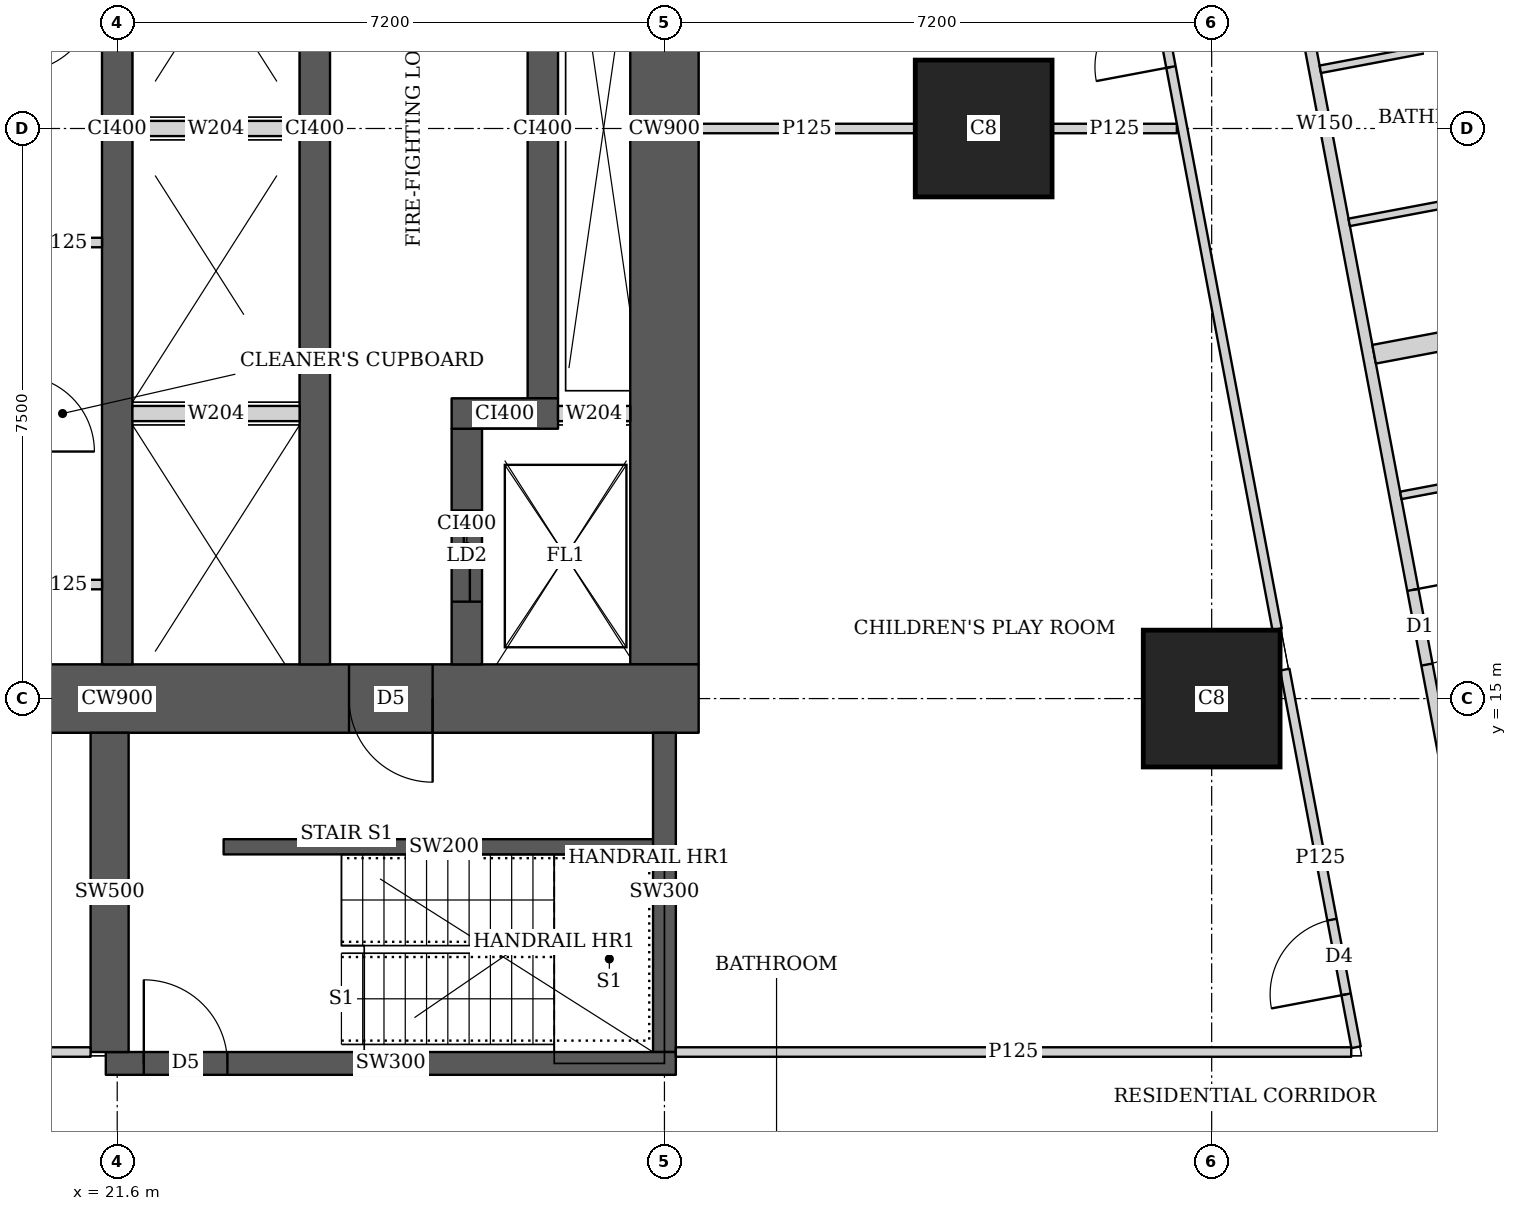
"""IFC4 building model, lengths in metres.
Left out: names, types, materials, properties, quantities, classifications, styles, units other than length and angle.
Written with IfcOpenShell. Run it as: python <this file> out.ifc"""

import sys

from ifc_helpers import new_model, si_unit, direction, frame, frame_2d, origin, origin_2d, place, context, subcontext, project, spatial, rectangle, extrude, element, fill, save


model = new_model("IFC4")
c1 = context("Model", 3, precision=1e-05, world=origin(), true_north=direction((0.0, 1.0)))
c2 = subcontext(c1, "Body", "Model", "MODEL_VIEW")
j1 = project(units=[si_unit("LENGTHUNIT", "METRE"), si_unit("PLANEANGLEUNIT", "RADIAN")], contexts=[c1])
p1 = place(None, origin())
s1 = spatial("IfcSite", under=j1, at=p1, CompositionType="ELEMENT")
p2 = place(p1, origin())
s2 = spatial("IfcBuilding", under=s1, at=p2, CompositionType="ELEMENT")
p3 = place(p2, frame((0.0, 0.0, 65.0)))
s3 = spatial("IfcBuildingStorey", under=s2, at=p3, CompositionType="ELEMENT", Elevation=65.0)
for number, where, z_axis, x_axis in (
    (1, (36.0, 15.0, 0.0), (0.0, 0.0, 1.0), (1.0, 0.0, 0.0)),
    (2, (33.0, 22.5, 0.0), (0.0, 0.0, 1.0), (1.0, 0.0, 0.0)),
):
    element("IfcColumn", number, at=place(p3, frame(where, z_axis=z_axis, x_axis=x_axis)), inside=s3, PredefinedType="COLUMN", context=c2, shape_type="SweptSolid", body=[
        extrude(rectangle(XDim=1.8, YDim=1.8, at=origin_2d()), origin(), (0.0, 0.0, 1.0), 3.75),
    ])
p4 = place(p3, frame((13.95, 15.0, 0.0), z_axis=(0.0, 0.0, 1.0), x_axis=(1.0, 0.0, 0.0)))
e3 = element("IfcWall", 3, at=p4, inside=s3, PredefinedType="SHEAR", context=c2, shape_type="SweptSolid", body=[
    extrude(rectangle(XDim=15.3, YDim=0.9, at=frame_2d((7.65, 0.0))), origin(), (0.0, 0.0, 1.0), 3.75),
])
p5 = place(p4, frame((4.45, 0.0, 0.0)))
e4 = element("IfcOpeningElement", 4, at=p5, cuts=e3, PredefinedType="OPENING", context=c2, shape_type="SweptSolid", body=[
    extrude(rectangle(XDim=1.8, YDim=2.1, at=frame_2d((0.9, 1.05))), frame((0.0, 0.46, 0.0), z_axis=(0.0, -1.0, 0.0), x_axis=(1.0, 0.0, 0.0)), (0.0, 0.0, 1.0), 0.92),
])
p6 = place(p4, frame((10.7, 0.0, 0.0)))
e5 = element("IfcOpeningElement", 5, at=p6, cuts=e3, PredefinedType="OPENING", context=c2, shape_type="SweptSolid", body=[
    extrude(rectangle(XDim=1.1, YDim=2.1, at=frame_2d((0.55, 1.05))), frame((0.0, 0.46, 0.0), z_axis=(0.0, -1.0, 0.0), x_axis=(1.0, 0.0, 0.0)), (0.0, 0.0, 1.0), 0.92),
])
p7 = place(p3, frame((28.8, 15.45, 0.0), z_axis=(0.0, 0.0, 1.0), x_axis=(0.0, 1.0, 0.0)))
e6 = element("IfcWall", 6, at=p7, inside=s3, PredefinedType="SHEAR", context=c2, shape_type="SweptSolid", body=[
    extrude(rectangle(XDim=14.1, YDim=0.9, at=frame_2d((7.05, 0.0))), origin(), (0.0, 0.0, 1.0), 3.75),
])
for number, where, z_axis, x_axis in (
    (7, (21.6, 15.45, 0.0), (0.0, 0.0, 1.0), (0.0, 1.0, 0.0)),
    (8, (24.2, 15.45, 0.0), (0.0, 0.0, 1.0), (0.0, 1.0, 0.0)),
):
    element("IfcWall", number, at=place(p3, frame(where, z_axis=z_axis, x_axis=x_axis)), inside=s3, PredefinedType="SHEAR", context=c2, shape_type="SweptSolid", body=[
        extrude(rectangle(XDim=14.1, YDim=0.4, at=frame_2d((7.05, 0.0))), origin(), (0.0, 0.0, 1.0), 3.75),
    ])
p8 = place(p3, frame((26.2, 15.45, 0.0), z_axis=(0.0, 0.0, 1.0), x_axis=(0.0, 1.0, 0.0)))
e9 = element("IfcWall", 9, at=p8, inside=s3, PredefinedType="SHEAR", context=c2, shape_type="SweptSolid", body=[
    extrude(rectangle(XDim=3.1, YDim=0.4, at=frame_2d((1.55, 0.0))), origin(), (0.0, 0.0, 1.0), 3.75),
])
p9 = place(p8, frame((0.825, 0.0, 0.0)))
e10 = element("IfcOpeningElement", 10, at=p9, cuts=e9, PredefinedType="OPENING", context=c2, shape_type="SweptSolid", body=[
    extrude(rectangle(XDim=1.2, YDim=2.1, at=frame_2d((0.6, 1.05))), frame((0.0, 0.21, 0.0), z_axis=(0.0, -1.0, 0.0), x_axis=(1.0, 0.0, 0.0)), (0.0, 0.0, 1.0), 0.42),
])
p10 = place(p3, frame((26.0, 18.75, 0.0), z_axis=(0.0, 0.0, 1.0), x_axis=(1.0, 0.0, 0.0)))
e11 = element("IfcWall", 11, at=p10, inside=s3, PredefinedType="SHEAR", context=c2, shape_type="SweptSolid", body=[
    extrude(rectangle(XDim=1.4, YDim=0.4, at=frame_2d((0.7, 0.0))), origin(), (0.0, 0.0, 1.0), 3.75),
])
p11 = place(p3, frame((27.2, 18.95, 0.0), z_axis=(0.0, 0.0, 1.0), x_axis=(0.0, 1.0, 0.0)))
e12 = element("IfcWall", 12, at=p11, inside=s3, PredefinedType="SHEAR", context=c2, shape_type="SweptSolid", body=[
    extrude(rectangle(XDim=7.1, YDim=0.4, at=frame_2d((3.55, 0.0))), origin(), (0.0, 0.0, 1.0), 3.75),
])
p12 = place(p3, frame((21.45, 10.2, 0.0), z_axis=(0.0, 0.0, 1.0), x_axis=(1.0, 0.0, 0.0)))
e13 = element("IfcWall", 13, at=p12, inside=s3, PredefinedType="SHEAR", context=c2, shape_type="SweptSolid", body=[
    extrude(rectangle(XDim=7.5, YDim=0.3, at=frame_2d((3.75, 0.0))), origin(), (0.0, 0.0, 1.0), 3.75),
])
p13 = place(p12, frame((0.5, 0.0, 0.0)))
e14 = element("IfcOpeningElement", 14, at=p13, cuts=e13, PredefinedType="OPENING", context=c2, shape_type="SweptSolid", body=[
    extrude(rectangle(XDim=1.1, YDim=2.1, at=frame_2d((0.55, 1.05))), frame((0.0, 0.16, 0.0), z_axis=(0.0, -1.0, 0.0), x_axis=(1.0, 0.0, 0.0)), (0.0, 0.0, 1.0), 0.32),
])
p14 = place(p3, frame((21.5, 10.35, 0.0), z_axis=(0.0, 0.0, 1.0), x_axis=(0.0, 1.0, 0.0)))
e15 = element("IfcWall", 15, at=p14, inside=s3, PredefinedType="SHEAR", context=c2, shape_type="SweptSolid", body=[
    extrude(rectangle(XDim=4.2, YDim=0.5, at=frame_2d((2.1, 0.0))), origin(), (0.0, 0.0, 1.0), 3.75),
])
p15 = place(p3, frame((28.8, 10.35, 0.0), z_axis=(0.0, 0.0, 1.0), x_axis=(0.0, 1.0, 0.0)))
e16 = element("IfcWall", 16, at=p15, inside=s3, PredefinedType="SHEAR", context=c2, shape_type="SweptSolid", body=[
    extrude(rectangle(XDim=4.2, YDim=0.3, at=frame_2d((2.1, 0.0))), origin(), (0.0, 0.0, 1.0), 3.75),
])
p16 = place(p3, frame((33.68, 42.723, 0.0), z_axis=(0.0, 0.0, 1.0), x_axis=(0.185624129307, -0.98262082342, 0.0)))
e17 = element("IfcWall", 17, at=p16, inside=s3, PredefinedType="SOLIDWALL", context=c2, shape_type="SweptSolid", body=[
    extrude(rectangle(XDim=41.051, YDim=0.15, at=frame_2d((20.526, 0.0))), origin(), (0.0, 0.0, 1.0), 2.5),
])
p17 = place(p16, frame((13.577, 0.0, 0.0)))
e18 = element("IfcOpeningElement", 18, at=p17, cuts=e17, PredefinedType="OPENING", context=c2, shape_type="SweptSolid", body=[
    extrude(rectangle(XDim=1.0, YDim=2.1, at=frame_2d((0.5, 1.05))), frame((0.0, 0.085, 0.0), z_axis=(0.0, -1.0, 0.0), x_axis=(1.0, 0.0, 0.0)), (0.0, 0.0, 1.0), 0.17),
])
p18 = place(p16, frame((17.394, 0.0, 0.0)))
e19 = element("IfcOpeningElement", 19, at=p18, cuts=e17, PredefinedType="OPENING", context=c2, shape_type="SweptSolid", body=[
    extrude(rectangle(XDim=1.0, YDim=2.1, at=frame_2d((0.5, 1.05))), frame((0.0, 0.085, 0.0), z_axis=(0.0, -1.0, 0.0), x_axis=(1.0, 0.0, 0.0)), (0.0, 0.0, 1.0), 0.17),
])
p19 = place(p16, frame((26.758, 0.0, 0.0)))
e20 = element("IfcOpeningElement", 20, at=p19, cuts=e17, PredefinedType="OPENING", context=c2, shape_type="SweptSolid", body=[
    extrude(rectangle(XDim=1.0, YDim=2.1, at=frame_2d((0.5, 1.05))), frame((0.0, 0.085, 0.0), z_axis=(0.0, -1.0, 0.0), x_axis=(1.0, 0.0, 0.0)), (0.0, 0.0, 1.0), 0.17),
])
p20 = place(p16, frame((32.193, 0.0, 0.0)))
e21 = element("IfcOpeningElement", 21, at=p20, cuts=e17, PredefinedType="OPENING", context=c2, shape_type="SweptSolid", body=[
    extrude(rectangle(XDim=1.0, YDim=2.1, at=frame_2d((0.5, 1.05))), frame((0.0, 0.085, 0.0), z_axis=(0.0, -1.0, 0.0), x_axis=(1.0, 0.0, 0.0)), (0.0, 0.0, 1.0), 0.17),
])
p21 = place(p3, frame((40.893, 23.934, 0.0), z_axis=(0.0, 0.0, 1.0), x_axis=(-0.982588017646, -0.185797706064, 0.0)))
e22 = element("IfcWall", 22, at=p21, inside=s3, PredefinedType="PARTITIONING", context=c2, shape_type="SweptSolid", body=[
    extrude(rectangle(XDim=3.525, YDim=0.1, at=frame_2d((1.763, 0.0))), origin(), (0.0, 0.0, 1.0), 3.5),
])
p22 = place(p3, frame((41.273, 21.919, 0.0), z_axis=(0.0, 0.0, 1.0), x_axis=(-0.982636169624, -0.185542874149, 0.0)))
e23 = element("IfcWall", 23, at=p22, inside=s3, PredefinedType="PARTITIONING", context=c2, shape_type="SweptSolid", body=[
    extrude(rectangle(XDim=3.525, YDim=0.1, at=frame_2d((1.763, 0.0))), origin(), (0.0, 0.0, 1.0), 2.5),
])
p23 = place(p3, frame((41.952, 18.327, 0.0), z_axis=(0.0, 0.0, 1.0), x_axis=(-0.982648794755, -0.185475998897, 0.0)))
e24 = element("IfcWall", 24, at=p23, inside=s3, PredefinedType="PARTITIONING", context=c2, shape_type="SweptSolid", body=[
    extrude(rectangle(XDim=3.525, YDim=0.1, at=frame_2d((1.763, 0.0))), origin(), (0.0, 0.0, 1.0), 3.5),
])
p24 = place(p3, frame((42.829, 20.416, 0.0), z_axis=(0.0, 0.0, 1.0), x_axis=(-0.982635807605, -0.185544791394, 0.0)))
e25 = element("IfcWall", 25, at=p24, inside=s3, PredefinedType="SOLIDWALL", context=c2, shape_type="SweptSolid", body=[
    extrude(rectangle(XDim=4.775, YDim=0.25, at=frame_2d((2.388, 0.0))), origin(), (0.0, 0.0, 1.0), 3.5),
])
p25 = place(p3, frame((10.413, 10.35, 0.0), z_axis=(0.0, 0.0, 1.0), x_axis=(1.0, 0.0, 0.0)))
e26 = element("IfcWall", 26, at=p25, inside=s3, PredefinedType="PARTITIONING", context=c2, shape_type="SweptSolid", body=[
    extrude(rectangle(XDim=10.837, YDim=0.125, at=frame_2d((5.418, 0.0))), origin(), (0.0, 0.0, 1.0), 3.5),
])
p26 = place(p25, frame((7.582, 0.0, 0.0)))
e27 = element("IfcOpeningElement", 27, at=p26, cuts=e26, PredefinedType="OPENING", context=c2, shape_type="SweptSolid", body=[
    extrude(rectangle(XDim=1.8, YDim=2.1, at=frame_2d((0.9, 1.05))), frame((0.0, 0.073, 0.0), z_axis=(0.0, -1.0, 0.0), x_axis=(1.0, 0.0, 0.0)), (0.0, 0.0, 1.0), 0.145),
])
p27 = place(p3, frame((28.95, 10.35, 0.0), z_axis=(0.0, 0.0, 1.0), x_axis=(1.0, 0.0, 0.0)))
e28 = element("IfcWall", 28, at=p27, inside=s3, PredefinedType="PARTITIONING", context=c2, shape_type="SweptSolid", body=[
    extrude(rectangle(XDim=8.886, YDim=0.125, at=frame_2d((4.443, 0.0))), origin(), (0.0, 0.0, 1.0), 3.5),
])
p28 = place(p3, frame((37.9, 10.413, 0.0), z_axis=(0.0, 0.0, 1.0), x_axis=(-0.185527510388, 0.982639070508, 0.0)))
e29 = element("IfcWall", 29, at=p28, inside=s3, PredefinedType="PARTITIONING", context=c2, shape_type="SweptSolid", body=[
    extrude(rectangle(XDim=5.056, YDim=0.125, at=frame_2d((2.528, 0.0))), origin(), (0.0, 0.0, 1.0), 3.5),
])
p29 = place(p28, frame((0.708, 0.0, 0.0)))
e30 = element("IfcOpeningElement", 30, at=p29, cuts=e29, PredefinedType="OPENING", context=c2, shape_type="SweptSolid", body=[
    extrude(rectangle(XDim=1.0, YDim=2.1, at=frame_2d((0.5, 1.05))), frame((0.0, 0.073, 0.0), z_axis=(0.0, -1.0, 0.0), x_axis=(1.0, 0.0, 0.0)), (0.0, 0.0, 1.0), 0.145),
])
p30 = place(p3, frame((36.861, 15.913, 0.0), z_axis=(0.0, 0.0, 1.0), x_axis=(-0.185588307143, 0.982627589808, 0.0)))
e31 = element("IfcWall", 31, at=p30, inside=s3, PredefinedType="PARTITIONING", context=c2, shape_type="SweptSolid", body=[
    extrude(rectangle(XDim=19.005, YDim=0.125, at=frame_2d((9.502, 0.0))), origin(), (0.0, 0.0, 1.0), 2.5),
])
p31 = place(p30, frame((7.527, 0.0, 0.0)))
e32 = element("IfcOpeningElement", 32, at=p31, cuts=e31, PredefinedType="OPENING", context=c2, shape_type="SweptSolid", body=[
    extrude(rectangle(XDim=1.0, YDim=2.1, at=frame_2d((0.5, 1.05))), frame((0.0, 0.073, 0.0), z_axis=(0.0, -1.0, 0.0), x_axis=(1.0, 0.0, 0.0)), (0.0, 0.0, 1.0), 0.145),
])
p32 = place(p30, frame((15.5, 0.0, 0.0)))
e33 = element("IfcOpeningElement", 33, at=p32, cuts=e31, PredefinedType="OPENING", context=c2, shape_type="SweptSolid", body=[
    extrude(rectangle(XDim=1.0, YDim=2.1, at=frame_2d((0.5, 1.05))), frame((0.0, 0.073, 0.0), z_axis=(0.0, -1.0, 0.0), x_axis=(1.0, 0.0, 0.0)), (0.0, 0.0, 1.0), 0.145),
])
p33 = place(p30, frame((17.602, 0.0, 0.0)))
e34 = element("IfcOpeningElement", 34, at=p33, cuts=e31, PredefinedType="OPENING", context=c2, shape_type="SweptSolid", body=[
    extrude(rectangle(XDim=1.0, YDim=2.1, at=frame_2d((0.5, 1.05))), frame((0.0, 0.073, 0.0), z_axis=(0.0, -1.0, 0.0), x_axis=(1.0, 0.0, 0.0)), (0.0, 0.0, 1.0), 0.145),
])
p34 = place(p3, frame((29.25, 22.5, 0.0), z_axis=(0.0, 0.0, 1.0), x_axis=(1.0, 0.0, 0.0)))
e35 = element("IfcWall", 35, at=p34, inside=s3, PredefinedType="PARTITIONING", context=c2, shape_type="SweptSolid", body=[
    extrude(rectangle(XDim=2.849, YDim=0.125, at=frame_2d((1.425, 0.0))), origin(), (0.0, 0.0, 1.0), 3.5),
])
p35 = place(p3, frame((33.901, 22.5, 0.0), z_axis=(0.0, 0.0, 1.0), x_axis=(1.0, 0.0, 0.0)))
e36 = element("IfcWall", 36, at=p35, inside=s3, PredefinedType="PARTITIONING", context=c2, shape_type="SweptSolid", body=[
    extrude(rectangle(XDim=1.641, YDim=0.125, at=frame_2d((0.821, 0.0))), origin(), (0.0, 0.0, 1.0), 2.5),
])
for number, where, z_axis, x_axis in (
    (37, (20.363, 16.5, 0.0), (0.0, 0.0, 1.0), (1.0, 0.0, 0.0)),
    (38, (20.363, 21.0, 0.0), (0.0, 0.0, 1.0), (1.0, 0.0, 0.0)),
):
    element("IfcWall", number, at=place(p3, frame(where, z_axis=z_axis, x_axis=x_axis)), inside=s3, PredefinedType="PARTITIONING", context=c2, shape_type="SweptSolid", body=[
        extrude(rectangle(XDim=1.037, YDim=0.125, at=frame_2d((0.519, 0.0))), origin(), (0.0, 0.0, 1.0), 3.5),
    ])
p36 = place(p3, frame((23.0, 13.05, 0.0), z_axis=(0.0, 0.0, 1.0), x_axis=(1.0, 0.0, 0.0)))
e39 = element("IfcWall", 39, at=p36, inside=s3, PredefinedType="SHEAR", context=c2, shape_type="SweptSolid", body=[
    extrude(rectangle(XDim=5.8, YDim=0.2, at=frame_2d((2.9, 0.0))), origin(), (0.0, 0.0, 1.0), 3.75),
])
for number, where, z_axis, x_axis in (
    (40, (21.8, 18.75, 0.0), (0.0, 0.0, 1.0), (1.0, 0.0, 0.0)),
    (41, (21.8, 22.5, 0.0), (0.0, 0.0, 1.0), (1.0, 0.0, 0.0)),
):
    element("IfcWall", number, at=place(p3, frame(where, z_axis=z_axis, x_axis=x_axis)), inside=s3, PredefinedType="SOLIDWALL", context=c2, shape_type="SweptSolid", body=[
        extrude(rectangle(XDim=2.2, YDim=0.2, at=frame_2d((1.1, 0.0))), origin(), (0.0, 0.0, 1.0), 3.5),
    ])
p37 = place(p3, frame((27.4, 18.75, 0.0), z_axis=(0.0, 0.0, 1.0), x_axis=(1.0, 0.0, 0.0)))
e42 = element("IfcWall", 42, at=p37, inside=s3, PredefinedType="SOLIDWALL", context=c2, shape_type="SweptSolid", body=[
    extrude(rectangle(XDim=0.95, YDim=0.2, at=frame_2d((0.475, 0.0))), origin(), (0.0, 0.0, 1.0), 3.5),
])
p38 = place(p19, origin())
e43 = element("IfcDoor", 43, at=p38, inside=s3, OperationType="SINGLE_SWING_LEFT", PredefinedType="DOOR", context=c2, shape_type="SweptSolid", body=[
    extrude(rectangle(XDim=1.0, YDim=2.1, at=frame_2d((0.5, 1.05))), frame((0.0, 0.025, 0.0), z_axis=(0.0, -1.0, 0.0), x_axis=(1.0, 0.0, 0.0)), (0.0, 0.0, 1.0), 0.05),
])
fill(e20, e43)
p39 = place(p29, origin())
e44 = element("IfcDoor", 44, at=p39, inside=s3, OperationType="SINGLE_SWING_LEFT", PredefinedType="DOOR", context=c2, shape_type="SweptSolid", body=[
    extrude(rectangle(XDim=1.0, YDim=2.1, at=frame_2d((0.5, 1.05))), frame((0.0, 0.025, 0.0), z_axis=(0.0, -1.0, 0.0), x_axis=(1.0, 0.0, 0.0)), (0.0, 0.0, 1.0), 0.05),
])
fill(e30, e44)
p40 = place(p31, origin())
e45 = element("IfcDoor", 45, at=p40, inside=s3, OperationType="SINGLE_SWING_LEFT", PredefinedType="DOOR", context=c2, shape_type="SweptSolid", body=[
    extrude(rectangle(XDim=1.0, YDim=2.1, at=frame_2d((0.5, 1.05))), frame((0.0, 0.025, 0.0), z_axis=(0.0, -1.0, 0.0), x_axis=(1.0, 0.0, 0.0)), (0.0, 0.0, 1.0), 0.05),
])
fill(e32, e45)
p41 = place(p6, origin())
e46 = element("IfcDoor", 46, at=p41, inside=s3, OperationType="SINGLE_SWING_LEFT", PredefinedType="DOOR", context=c2, shape_type="SweptSolid", body=[
    extrude(rectangle(XDim=1.1, YDim=2.1, at=frame_2d((0.55, 1.05))), frame((0.0, 0.025, 0.0), z_axis=(0.0, -1.0, 0.0), x_axis=(1.0, 0.0, 0.0)), (0.0, 0.0, 1.0), 0.05),
])
fill(e5, e46)
p42 = place(p9, origin())
e47 = element("IfcDoor", 47, at=p42, inside=s3, OperationType="DOUBLE_DOOR_SLIDING", PredefinedType="DOOR", context=c2, shape_type="SweptSolid", body=[
    extrude(rectangle(XDim=1.2, YDim=2.1, at=frame_2d((0.6, 1.05))), frame((0.0, 0.025, 0.0), z_axis=(0.0, -1.0, 0.0), x_axis=(1.0, 0.0, 0.0)), (0.0, 0.0, 1.0), 0.05),
])
fill(e10, e47)
p43 = place(p13, origin())
e48 = element("IfcDoor", 48, at=p43, inside=s3, OperationType="SINGLE_SWING_LEFT", PredefinedType="DOOR", context=c2, shape_type="SweptSolid", body=[
    extrude(rectangle(XDim=1.1, YDim=2.1, at=frame_2d((0.55, 1.05))), frame((0.0, 0.025, 0.0), z_axis=(0.0, -1.0, 0.0), x_axis=(1.0, 0.0, 0.0)), (0.0, 0.0, 1.0), 0.05),
])
fill(e14, e48)
save(model, sys.argv[1])
